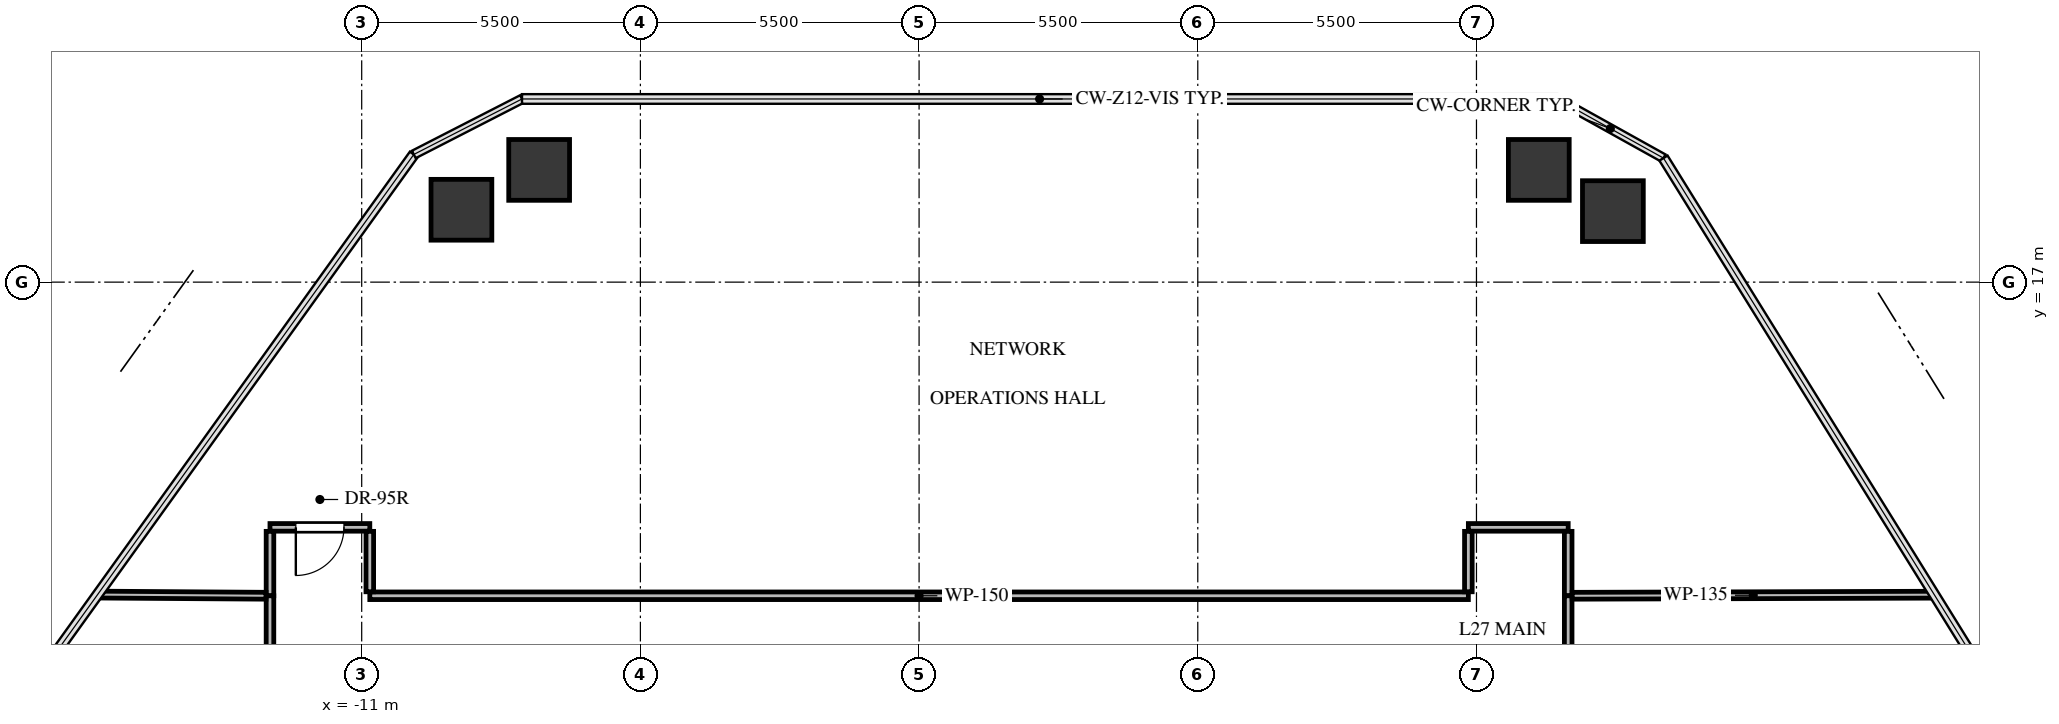
"""IFC4 building model, lengths in metres.
Left out: names, types, materials, properties, quantities, classifications, styles, units other than length and angle.
Written with IfcOpenShell. Run it as: python <this file> out.ifc"""

import sys

from ifc_helpers import new_model, si_unit, direction, frame, frame_2d, origin, origin_2d, place, context, subcontext, project, spatial, rectangle, extrude, source, transform, mapped, element, fill, save


model = new_model("IFC4")
c1 = context("Model", 3, precision=1e-05, world=origin(), true_north=direction((0.0, 1.0)))
c2 = subcontext(c1, "Body", "Model", "MODEL_VIEW")
j1 = project(units=[si_unit("LENGTHUNIT", "METRE"), si_unit("PLANEANGLEUNIT", "RADIAN")], contexts=[c1])
p1 = place(None, origin())
s1 = spatial("IfcSite", under=j1, at=p1, CompositionType="ELEMENT")
p2 = place(p1, origin())
s2 = spatial("IfcBuilding", under=s1, at=p2, CompositionType="ELEMENT")
p3 = place(p2, frame((0.0, 0.0, 104.1)))
s3 = spatial("IfcBuildingStorey", under=s2, at=p3, CompositionType="ELEMENT", Elevation=104.1)
m1 = source(origin(), c2, "Body", "SweptSolid", [
    extrude(rectangle(XDim=1.2, YDim=1.2, at=origin_2d()), origin(), (0.0, 0.0, 1.0), 3.3),
])
for number, where, z_axis, x_axis in (
    (1, (-9.032, 18.428, -0.24), (0.0, 0.0, 1.0), (1.0, 0.0, 0.0)),
    (2, (-7.498, 19.215, -0.24), (0.0, 0.0, 1.0), (1.0, 0.0, 0.0)),
    (3, (12.23, 19.215, -0.24), (0.0, 0.0, 1.0), (1.0, 0.0, 0.0)),
    (4, (13.692, 18.401, -0.24), (0.0, 0.0, 1.0), (1.0, 0.0, 0.0)),
):
    element("IfcColumn", number, at=place(p3, frame(where, z_axis=z_axis, x_axis=x_axis)), inside=s3, PredefinedType="COLUMN", context=c2, shape_type="MappedRepresentation", body=[
        mapped(m1, transform((0.0, 0.0, 0.0), x_axis=(1.0, 0.0, 0.0), y_axis=(0.0, 1.0, 0.0), z_axis=(0.0, 0.0, 1.0), scale=1.0)),
    ])
p4 = place(p3, frame((10.84, 10.81, 0.0), z_axis=(0.0, 0.0, 1.0), x_axis=(-1.0, 0.0, 0.0)))
e5 = element("IfcWall", 5, at=p4, inside=s3, PredefinedType="PARTITIONING", context=c2, shape_type="SweptSolid", body=[
    extrude(rectangle(XDim=21.68, YDim=0.15, at=frame_2d((10.84, 0.0))), origin(), (0.0, 0.0, 1.0), 2.212),
])
p5 = place(p3, frame((12.81, 12.16, 0.0), z_axis=(0.0, 0.0, 1.0), x_axis=(-1.0, 0.0, 0.0)))
e6 = element("IfcWall", 6, at=p5, inside=s3, PredefinedType="PARTITIONING", context=c2, shape_type="SweptSolid", body=[
    extrude(rectangle(XDim=1.97, YDim=0.15, at=frame_2d((0.985, 0.0))), origin(), (0.0, 0.0, 1.0), 2.212),
])
p6 = place(p3, frame((-10.84, 12.16, 0.0), z_axis=(0.0, 0.0, 1.0), x_axis=(-1.0, 0.0, 0.0)))
e7 = element("IfcWall", 7, at=p6, inside=s3, PredefinedType="PARTITIONING", context=c2, shape_type="SweptSolid", body=[
    extrude(rectangle(XDim=1.97, YDim=0.15, at=frame_2d((0.985, 0.0))), origin(), (0.0, 0.0, 1.0), 3.045),
])
p7 = place(p6, frame((0.51, 0.0, 0.0)))
e8 = element("IfcOpeningElement", 8, at=p7, cuts=e7, PredefinedType="OPENING", context=c2, shape_type="SweptSolid", body=[
    extrude(rectangle(XDim=0.95, YDim=2.1, at=frame_2d((0.475, 1.05))), frame((0.0, 0.085, 0.0), z_axis=(0.0, -1.0, 0.0), x_axis=(1.0, 0.0, 0.0)), (0.0, 0.0, 1.0), 0.17),
])
p8 = place(p3, frame((12.81, 10.81, 0.0), z_axis=(0.0, 0.0, 1.0), x_axis=(0.0, 1.0, 0.0)))
e9 = element("IfcWall", 9, at=p8, inside=s3, PredefinedType="PARTITIONING", context=c2, shape_type="SweptSolid", body=[
    extrude(rectangle(XDim=1.271, YDim=0.15, at=frame_2d((0.635, 0.0))), origin(), (0.0, 0.0, 1.0), 3.045),
])
p9 = place(p3, frame((10.84, 12.081, 0.0), z_axis=(0.0, 0.0, 1.0), x_axis=(0.0, -1.0, 0.0)))
e10 = element("IfcWall", 10, at=p9, inside=s3, PredefinedType="PARTITIONING", context=c2, shape_type="SweptSolid", body=[
    extrude(rectangle(XDim=1.192, YDim=0.15, at=frame_2d((0.596, 0.0))), origin(), (0.0, 0.0, 1.0), 2.212),
])
p10 = place(p3, frame((-10.84, 10.889, 0.0), z_axis=(0.0, 0.0, 1.0), x_axis=(0.0, 1.0, 0.0)))
e11 = element("IfcWall", 11, at=p10, inside=s3, PredefinedType="PARTITIONING", context=c2, shape_type="SweptSolid", body=[
    extrude(rectangle(XDim=1.192, YDim=0.15, at=frame_2d((0.596, 0.0))), origin(), (0.0, 0.0, 1.0), 3.045),
])
p11 = place(p3, frame((-12.81, 12.081, 0.0), z_axis=(0.0, 0.0, 1.0), x_axis=(0.0, -1.0, 0.0)))
e12 = element("IfcWall", 12, at=p11, inside=s3, PredefinedType="PARTITIONING", context=c2, shape_type="SweptSolid", body=[
    extrude(rectangle(XDim=1.271, YDim=0.15, at=frame_2d((0.635, 0.0))), origin(), (0.0, 0.0, 1.0), 3.045),
])
p12 = place(p3, frame((-12.81, 10.81, 0.0), z_axis=(0.0, 0.0, 1.0), x_axis=(0.0, -1.0, 0.0)))
e13 = element("IfcWall", 13, at=p12, inside=s3, PredefinedType="PARTITIONING", context=c2, shape_type="SweptSolid", body=[
    extrude(rectangle(XDim=21.62, YDim=0.15, at=frame_2d((10.81, 0.0))), origin(), (0.0, 0.0, 1.0), 2.212),
])
p13 = place(p12, frame((10.335, 0.0, 0.0)))
e14 = element("IfcOpeningElement", 14, at=p13, cuts=e13, PredefinedType="OPENING", context=c2, shape_type="SweptSolid", body=[
    extrude(rectangle(XDim=0.95, YDim=2.1, at=frame_2d((0.475, 1.05))), frame((0.0, 0.085, 0.0), z_axis=(0.0, -1.0, 0.0), x_axis=(1.0, 0.0, 0.0)), (0.0, 0.0, 1.0), 0.17),
])
p14 = place(p3, frame((12.81, 2.49, 0.0), z_axis=(0.0, 0.0, 1.0), x_axis=(0.0, 1.0, 0.0)))
e15 = element("IfcWall", 15, at=p14, inside=s3, PredefinedType="PARTITIONING", context=c2, shape_type="SweptSolid", body=[
    extrude(rectangle(XDim=8.32, YDim=0.15, at=frame_2d((4.16, 0.0))), origin(), (0.0, 0.0, 1.0), 3.045),
])
p15 = place(p14, frame((3.7, 0.0, 0.0)))
e16 = element("IfcOpeningElement", 16, at=p15, cuts=e15, PredefinedType="OPENING", context=c2, shape_type="SweptSolid", body=[
    extrude(rectangle(XDim=0.92, YDim=2.1, at=frame_2d((0.46, 1.05))), frame((0.0, 0.085, 0.0), z_axis=(0.0, -1.0, 0.0), x_axis=(1.0, 0.0, 0.0)), (0.0, 0.0, 1.0), 0.17),
])
p16 = place(p3, frame((-12.889, 10.811, 0.0), z_axis=(0.0, 0.0, 1.0), x_axis=(-0.999976657862, 0.006832549348, 0.0)))
e17 = element("IfcWall", 17, at=p16, inside=s3, PredefinedType="PARTITIONING", context=c2, shape_type="SweptSolid", body=[
    extrude(rectangle(XDim=3.323, YDim=0.135, at=frame_2d((1.662, 0.0))), origin(), (0.0, 0.0, 1.0), 2.38),
])
p17 = place(p3, frame((20.035, 10.831, 0.0), z_axis=(0.0, 0.0, 1.0), x_axis=(-0.999995783715, -0.002903885812, 0.0)))
e18 = element("IfcWall", 18, at=p17, inside=s3, PredefinedType="PARTITIONING", context=c2, shape_type="SweptSolid", body=[
    extrude(rectangle(XDim=7.146, YDim=0.135, at=frame_2d((3.573, 0.0))), origin(), (0.0, 0.0, 1.0), 2.38),
])
m2 = source(origin(), c2, "Body", "SweptSolid", [
    extrude(rectangle(XDim=0.95, YDim=2.1, at=frame_2d((0.475, 1.05))), frame((0.0, 0.025, 0.0), z_axis=(0.0, -1.0, 0.0), x_axis=(1.0, 0.0, 0.0)), (0.0, 0.0, 1.0), 0.05),
])
p18 = place(p7, origin())
e19 = element("IfcDoor", 19, at=p18, inside=s3, OperationType="SINGLE_SWING_RIGHT", PredefinedType="DOOR", context=c2, shape_type="MappedRepresentation", body=[
    mapped(m2, transform((0.0, 0.0, 0.0), x_axis=(1.0, 0.0, 0.0), y_axis=(0.0, 1.0, 0.0), z_axis=(0.0, 0.0, 1.0), scale=1.0)),
])
fill(e8, e19)
save(model, sys.argv[1])
